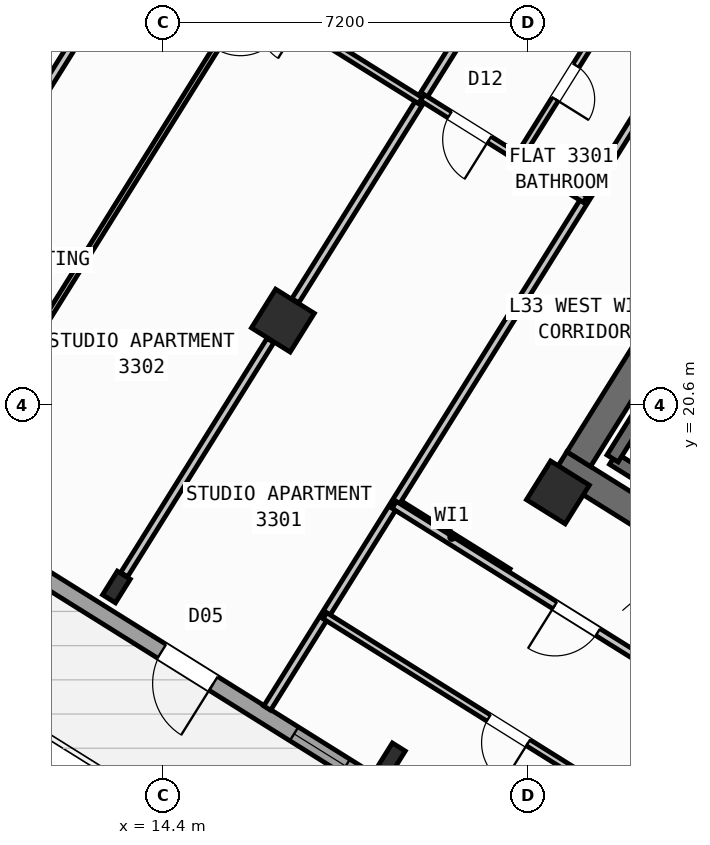
"""IFC4 building model, lengths in metres.
Left out: names, types, materials, properties, quantities, classifications, styles, units other than length and angle.
Written with IfcOpenShell. Run it as: python <this file> out.ifc"""

import sys

from ifc_helpers import new_model, si_unit, direction, frame, frame_2d, origin, origin_2d, place, context, subcontext, project, spatial, rectangle, hollow_rectangle, i_section, extrude, source, transform, mapped, element, fill, save


model = new_model("IFC4")
c1 = context("Model", 3, precision=1e-05, world=origin(), true_north=direction((0.0, 1.0)))
c2 = subcontext(c1, "Body", "Model", "MODEL_VIEW")
j1 = project(units=[si_unit("LENGTHUNIT", "METRE"), si_unit("PLANEANGLEUNIT", "RADIAN")], contexts=[c1])
p1 = place(None, origin())
s1 = spatial("IfcSite", under=j1, at=p1, CompositionType="ELEMENT")
p2 = place(p1, origin())
s2 = spatial("IfcBuilding", under=s1, at=p2, CompositionType="ELEMENT")
p3 = place(p2, frame((0.0, 0.0, 132.6)))
s3 = spatial("IfcBuildingStorey", under=s2, at=p3, CompositionType="ELEMENT", Elevation=132.6)
p4 = place(p3, frame((33.366, 12.477, 0.0), z_axis=(0.0, 0.0, 1.0), x_axis=(-0.848047359947, 0.529920442413, 0.0)))
e1 = element("IfcWall", 1, at=p4, inside=s3, PredefinedType="SHEAR", context=c2, shape_type="SweptSolid", body=[
    extrude(rectangle(XDim=13.14, YDim=0.55, at=frame_2d((6.57, 0.0))), origin(), (0.0, 0.0, 1.0), 3.32),
])
p5 = place(p3, frame((26.007, 24.976, 0.0), z_axis=(0.0, 0.0, 1.0), x_axis=(-0.529923795287, -0.848045264823, 0.0)))
e2 = element("IfcWall", 2, at=p5, inside=s3, PredefinedType="SHEAR", context=c2, shape_type="SweptSolid", body=[
    extrude(rectangle(XDim=6.425, YDim=0.55, at=frame_2d((3.212, 0.0))), origin(), (0.0, 0.0, 1.0), 3.32),
])
m1 = source(origin(), c2, "Body", "SweptSolid", [
    extrude(hollow_rectangle(XDim=0.9, YDim=0.9, WallThickness=0.036, at=origin_2d()), origin(), (0.0, 0.0, 1.0), 3.6),
])
p6 = place(p3, frame((22.191, 18.87, 0.0), z_axis=(0.0, 0.0, 1.0), x_axis=(-0.848048096156, 0.529919264233, 0.0)))
e3 = element("IfcColumn", 3, at=p6, inside=s3, PredefinedType="COLUMN", context=c2, shape_type="MappedRepresentation", body=[
    mapped(m1, transform((0.0, 0.0, 0.0), scale=1.0)),
])
m2 = source(origin(), c2, "Body", "SweptSolid", [
    extrude(i_section(OverallWidth=0.3, OverallDepth=0.55, WebThickness=0.015, FlangeThickness=0.029, at=origin_2d()), origin(), (0.0, 0.0, 1.0), 3.6),
])
p7 = place(p3, frame((18.906, 13.612, 0.0), z_axis=(0.0, 0.0, 1.0), x_axis=(-0.848048096156, 0.529919264233, 0.0)))
e4 = element("IfcColumn", 4, at=p7, inside=s3, PredefinedType="COLUMN", context=c2, shape_type="MappedRepresentation", body=[
    mapped(m2, transform((0.0, 0.0, 0.0), scale=1.0)),
])
p8 = place(p3, frame((16.764, 22.261, 0.0), z_axis=(0.0, 0.0, 1.0), x_axis=(-0.848048096156, 0.529919264233, 0.0)))
e5 = element("IfcColumn", 5, at=p8, inside=s3, PredefinedType="COLUMN", context=c2, shape_type="MappedRepresentation", body=[
    mapped(m1, transform((0.0, 0.0, 0.0), scale=1.0)),
])
p9 = place(p3, frame((13.478, 17.003, 0.0), z_axis=(0.0, 0.0, 1.0), x_axis=(-0.848048096156, 0.529919264233, 0.0)))
e6 = element("IfcColumn", 6, at=p9, inside=s3, PredefinedType="COLUMN", context=c2, shape_type="MappedRepresentation", body=[
    mapped(m2, transform((0.0, 0.0, 0.0), scale=1.0)),
])
p10 = place(p3, frame((29.268, 6.429, 0.0), z_axis=(0.0, 0.0, 1.0), x_axis=(-0.848049971435, 0.529916263149, 0.0)))
e7 = element("IfcWall", 7, at=p10, inside=s3, PredefinedType="STANDARD", context=c2, shape_type="SweptSolid", body=[
    extrude(rectangle(XDim=31.588, YDim=0.32, at=frame_2d((15.794, 0.0))), origin(), (0.0, 0.0, 1.0), 3.32),
])
p11 = place(p10, frame((16.362, 0.0, 0.0)))
e8 = element("IfcOpeningElement", 8, at=p11, cuts=e7, PredefinedType="OPENING", context=c2, shape_type="SweptSolid", body=[
    extrude(rectangle(XDim=1.2, YDim=2.15, at=frame_2d((0.6, 1.075))), frame((0.0, 0.17, 0.0), z_axis=(0.0, -1.0, 0.0), x_axis=(1.0, 0.0, 0.0)), (0.0, 0.0, 1.0), 0.34),
])
p12 = place(p10, frame((2.989, 0.0, 0.8)))
e9 = element("IfcOpeningElement", 9, at=p12, cuts=e7, PredefinedType="OPENING", context=c2, shape_type="SweptSolid", body=[
    extrude(rectangle(XDim=2.1, YDim=1.55, at=frame_2d((1.05, 0.775))), frame((0.0, 0.17, 0.0), z_axis=(0.0, -1.0, 0.0), x_axis=(1.0, 0.0, 0.0)), (0.0, 0.0, 1.0), 0.34),
])
p13 = place(p10, frame((8.359, 0.0, 0.8)))
e10 = element("IfcOpeningElement", 10, at=p13, cuts=e7, PredefinedType="OPENING", context=c2, shape_type="SweptSolid", body=[
    extrude(rectangle(XDim=2.1, YDim=1.55, at=frame_2d((1.05, 0.775))), frame((0.0, 0.17, 0.0), z_axis=(0.0, -1.0, 0.0), x_axis=(1.0, 0.0, 0.0)), (0.0, 0.0, 1.0), 0.34),
])
p14 = place(p10, frame((13.284, 0.0, 0.95)))
e11 = element("IfcOpeningElement", 11, at=p14, cuts=e7, PredefinedType="OPENING", context=c2, shape_type="SweptSolid", body=[
    extrude(rectangle(XDim=1.2, YDim=1.4, at=frame_2d((0.6, 0.7))), frame((0.0, 0.17, 0.0), z_axis=(0.0, -1.0, 0.0), x_axis=(1.0, 0.0, 0.0)), (0.0, 0.0, 1.0), 0.34),
])
p15 = place(p10, frame((20.39, 0.0, 0.95)))
e12 = element("IfcOpeningElement", 12, at=p15, cuts=e7, PredefinedType="OPENING", context=c2, shape_type="SweptSolid", body=[
    extrude(rectangle(XDim=1.2, YDim=1.4, at=frame_2d((0.6, 0.7))), frame((0.0, 0.17, 0.0), z_axis=(0.0, -1.0, 0.0), x_axis=(1.0, 0.0, 0.0)), (0.0, 0.0, 1.0), 0.34),
])
p16 = place(p10, frame((23.715, 0.0, 1.0)))
e13 = element("IfcOpeningElement", 13, at=p16, cuts=e7, PredefinedType="OPENING", context=c2, shape_type="SweptSolid", body=[
    extrude(rectangle(XDim=0.9, YDim=1.25, at=frame_2d((0.45, 0.625))), frame((0.0, 0.17, 0.0), z_axis=(0.0, -1.0, 0.0), x_axis=(1.0, 0.0, 0.0)), (0.0, 0.0, 1.0), 0.34),
])
p17 = place(p10, frame((27.481, 0.0, 0.8)))
e14 = element("IfcOpeningElement", 14, at=p17, cuts=e7, PredefinedType="OPENING", context=c2, shape_type="SweptSolid", body=[
    extrude(rectangle(XDim=2.1, YDim=1.55, at=frame_2d((1.05, 0.775))), frame((0.0, 0.17, 0.0), z_axis=(0.0, -1.0, 0.0), x_axis=(1.0, 0.0, 0.0)), (0.0, 0.0, 1.0), 0.34),
])
p18 = place(p3, frame((2.415, 23.452, 0.0), z_axis=(0.0, 0.0, 1.0), x_axis=(0.52991049553, 0.848053575387, 0.0)))
e15 = element("IfcWall", 15, at=p18, inside=s3, PredefinedType="STANDARD", context=c2, shape_type="SweptSolid", body=[
    extrude(rectangle(XDim=21.587, YDim=0.32, at=frame_2d((10.794, 0.0))), origin(), (0.0, 0.0, 1.0), 2.745),
])
p19 = place(p18, frame((2.168, 0.0, 0.8)))
e16 = element("IfcOpeningElement", 16, at=p19, cuts=e15, PredefinedType="OPENING", context=c2, shape_type="SweptSolid", body=[
    extrude(rectangle(XDim=2.1, YDim=1.55, at=frame_2d((1.05, 0.775))), frame((0.0, 0.17, 0.0), z_axis=(0.0, -1.0, 0.0), x_axis=(1.0, 0.0, 0.0)), (0.0, 0.0, 1.0), 0.34),
])
p20 = place(p18, frame((9.344, 0.0, 0.85)))
e17 = element("IfcOpeningElement", 17, at=p20, cuts=e15, PredefinedType="OPENING", context=c2, shape_type="SweptSolid", body=[
    extrude(rectangle(XDim=1.8, YDim=1.5, at=frame_2d((0.9, 0.75))), frame((0.0, 0.17, 0.0), z_axis=(0.0, -1.0, 0.0), x_axis=(1.0, 0.0, 0.0)), (0.0, 0.0, 1.0), 0.34),
])
p21 = place(p18, frame((18.459, 0.0, 0.85)))
e18 = element("IfcOpeningElement", 18, at=p21, cuts=e15, PredefinedType="OPENING", context=c2, shape_type="SweptSolid", body=[
    extrude(rectangle(XDim=1.5, YDim=1.5, at=frame_2d((0.75, 0.75))), frame((0.0, 0.17, 0.0), z_axis=(0.0, -1.0, 0.0), x_axis=(1.0, 0.0, 0.0)), (0.0, 0.0, 1.0), 0.34),
])
p22 = place(p3, frame((14.138, 41.825, 0.0), z_axis=(0.0, 0.0, 1.0), x_axis=(0.848046498049, -0.529921821731, 0.0)))
e19 = element("IfcWall", 19, at=p22, inside=s3, PredefinedType="STANDARD", context=c2, shape_type="SweptSolid", body=[
    extrude(rectangle(XDim=31.588, YDim=0.32, at=frame_2d((15.794, 0.0))), origin(), (0.0, 0.0, 1.0), 3.32),
])
p23 = place(p22, frame((3.253, 0.0, 0.0)))
e20 = element("IfcOpeningElement", 20, at=p23, cuts=e19, PredefinedType="OPENING", context=c2, shape_type="SweptSolid", body=[
    extrude(rectangle(XDim=1.05, YDim=2.15, at=frame_2d((0.525, 1.075))), frame((0.0, 0.17, 0.0), z_axis=(0.0, -1.0, 0.0), x_axis=(1.0, 0.0, 0.0)), (0.0, 0.0, 1.0), 0.34),
])
p24 = place(p22, frame((0.863, 0.0, 0.85)))
e21 = element("IfcOpeningElement", 21, at=p24, cuts=e19, PredefinedType="OPENING", context=c2, shape_type="SweptSolid", body=[
    extrude(rectangle(XDim=1.8, YDim=1.5, at=frame_2d((0.9, 0.75))), frame((0.0, 0.17, 0.0), z_axis=(0.0, -1.0, 0.0), x_axis=(1.0, 0.0, 0.0)), (0.0, 0.0, 1.0), 0.34),
])
p25 = place(p22, frame((8.435, 0.0, 0.85)))
e22 = element("IfcOpeningElement", 22, at=p25, cuts=e19, PredefinedType="OPENING", context=c2, shape_type="SweptSolid", body=[
    extrude(rectangle(XDim=1.8, YDim=1.5, at=frame_2d((0.9, 0.75))), frame((0.0, 0.17, 0.0), z_axis=(0.0, -1.0, 0.0), x_axis=(1.0, 0.0, 0.0)), (0.0, 0.0, 1.0), 0.34),
])
p26 = place(p22, frame((13.874, 0.0, 0.85)))
e23 = element("IfcOpeningElement", 23, at=p26, cuts=e19, PredefinedType="OPENING", context=c2, shape_type="SweptSolid", body=[
    extrude(rectangle(XDim=1.5, YDim=1.5, at=frame_2d((0.75, 0.75))), frame((0.0, 0.17, 0.0), z_axis=(0.0, -1.0, 0.0), x_axis=(1.0, 0.0, 0.0)), (0.0, 0.0, 1.0), 0.34),
])
p27 = place(p22, frame((17.104, 0.0, 1.0)))
e24 = element("IfcOpeningElement", 24, at=p27, cuts=e19, PredefinedType="OPENING", context=c2, shape_type="SweptSolid", body=[
    extrude(rectangle(XDim=0.9, YDim=1.25, at=frame_2d((0.45, 0.625))), frame((0.0, 0.17, 0.0), z_axis=(0.0, -1.0, 0.0), x_axis=(1.0, 0.0, 0.0)), (0.0, 0.0, 1.0), 0.34),
])
p28 = place(p22, frame((22.131, 0.0, 1.0)))
e25 = element("IfcOpeningElement", 25, at=p28, cuts=e19, PredefinedType="OPENING", context=c2, shape_type="SweptSolid", body=[
    extrude(rectangle(XDim=0.9, YDim=1.25, at=frame_2d((0.45, 0.625))), frame((0.0, 0.17, 0.0), z_axis=(0.0, -1.0, 0.0), x_axis=(1.0, 0.0, 0.0)), (0.0, 0.0, 1.0), 0.34),
])
p29 = place(p22, frame((27.706, 0.0, 1.0)))
e26 = element("IfcOpeningElement", 26, at=p29, cuts=e19, PredefinedType="OPENING", context=c2, shape_type="SweptSolid", body=[
    extrude(rectangle(XDim=0.9, YDim=1.25, at=frame_2d((0.45, 0.625))), frame((0.0, 0.17, 0.0), z_axis=(0.0, -1.0, 0.0), x_axis=(1.0, 0.0, 0.0)), (0.0, 0.0, 1.0), 0.34),
])
p30 = place(p3, frame((29.605, 15.581, 0.0), z_axis=(0.0, 0.0, 1.0), x_axis=(-0.848036911448, 0.529937163087, 0.0)))
e27 = element("IfcWall", 27, at=p30, inside=s3, PredefinedType="SHEAR", context=c2, shape_type="SweptSolid", body=[
    extrude(rectangle(XDim=7.46, YDim=0.26, at=frame_2d((3.73, 0.0))), origin(), (0.0, 0.0, 1.0), 3.32),
])
p31 = place(p3, frame((24.945, 22.22, 0.0), z_axis=(0.0, 0.0, 1.0), x_axis=(-0.529908658664, -0.84805472316, 0.0)))
e28 = element("IfcWall", 28, at=p31, inside=s3, PredefinedType="SHEAR", context=c2, shape_type="SweptSolid", body=[
    extrude(rectangle(XDim=3.16, YDim=0.26, at=frame_2d((1.58, 0.0))), origin(), (0.0, 0.0, 1.0), 3.32),
])
p32 = place(p3, frame((21.206, 17.292, 0.0), z_axis=(0.0, 0.0, 1.0), x_axis=(-0.848050851465, 0.529914854792, 0.0)))
e29 = element("IfcWall", 29, at=p32, inside=s3, PredefinedType="PARTITIONING", context=c2, shape_type="SweptSolid", body=[
    extrude(rectangle(XDim=2.61, YDim=0.16, at=frame_2d((1.305, 0.0))), origin(), (0.0, 0.0, 1.0), 3.31),
])
p33 = place(p3, frame((24.588, 27.631, 0.0), z_axis=(0.0, 0.0, 1.0), x_axis=(-0.529914586043, -0.848051019396, 0.0)))
e30 = element("IfcWall", 30, at=p33, inside=s3, PredefinedType="PARTITIONING", context=c2, shape_type="SweptSolid", body=[
    extrude(rectangle(XDim=15.35, YDim=0.16, at=frame_2d((7.675, 0.0))), origin(), (0.0, 0.0, 1.0), 3.31),
])
p34 = place(p3, frame((20.387, 28.06, 0.0), z_axis=(0.0, 0.0, 1.0), x_axis=(-0.529902564924, -0.848058530814, 0.0)))
e31 = element("IfcWall", 31, at=p34, inside=s3, PredefinedType="PARTITIONING", context=c2, shape_type="SweptSolid", body=[
    extrude(rectangle(XDim=6.376, YDim=0.16, at=frame_2d((3.188, 0.0))), origin(), (0.0, 0.0, 1.0), 2.745),
])
p35 = place(p3, frame((16.519, 21.87, 0.0), z_axis=(0.0, 0.0, 1.0), x_axis=(-0.529922447305, -0.848046107144, 0.0)))
e32 = element("IfcWall", 32, at=p35, inside=s3, PredefinedType="PARTITIONING", context=c2, shape_type="SweptSolid", body=[
    extrude(rectangle(XDim=5.451, YDim=0.16, at=frame_2d((2.726, 0.0))), origin(), (0.0, 0.0, 1.0), 2.745),
])
p36 = place(p3, frame((22.728, 24.654, 0.0), z_axis=(0.0, 0.0, 1.0), x_axis=(-0.848059820872, 0.529900500304, 0.0)))
e33 = element("IfcWall", 33, at=p36, inside=s3, PredefinedType="PLUMBINGWALL", context=c2, shape_type="SweptSolid", body=[
    extrude(rectangle(XDim=3.79, YDim=0.14, at=frame_2d((1.895, 0.0))), origin(), (0.0, 0.0, 1.0), 3.31),
])
p37 = place(p36, frame((2.23, 0.0, 0.0)))
e34 = element("IfcOpeningElement", 34, at=p37, cuts=e33, PredefinedType="OPENING", context=c2, shape_type="SweptSolid", body=[
    extrude(rectangle(XDim=0.92, YDim=2.08, at=frame_2d((0.46, 1.04))), frame((0.0, 0.08, 0.0), z_axis=(0.0, -1.0, 0.0), x_axis=(1.0, 0.0, 0.0)), (0.0, 0.0, 1.0), 0.16),
])
p38 = place(p3, frame((23.273, 28.452, 0.0), z_axis=(0.0, 0.0, 1.0), x_axis=(-0.529867639402, -0.848080352747, 0.0)))
e35 = element("IfcWall", 35, at=p38, inside=s3, PredefinedType="PLUMBINGWALL", context=c2, shape_type="SweptSolid", body=[
    extrude(rectangle(XDim=3.51, YDim=0.14, at=frame_2d((1.755, 0.0))), origin(), (0.0, 0.0, 1.0), 2.935),
])
p39 = place(p38, frame((1.365, 0.0, 0.0)))
e36 = element("IfcOpeningElement", 36, at=p39, cuts=e35, PredefinedType="OPENING", context=c2, shape_type="SweptSolid", body=[
    extrude(rectangle(XDim=0.78, YDim=2.05, at=frame_2d((0.39, 1.025))), frame((0.0, 0.08, 0.0), z_axis=(0.0, -1.0, 0.0), x_axis=(1.0, 0.0, 0.0)), (0.0, 0.0, 1.0), 0.16),
])
p40 = place(p3, frame((14.96, 31.452, 0.0), z_axis=(0.0, 0.0, 1.0), x_axis=(-0.529947310719, -0.848030570122, 0.0)))
e37 = element("IfcWall", 37, at=p40, inside=s3, PredefinedType="PARTITIONING", context=c2, shape_type="SweptSolid", body=[
    extrude(rectangle(XDim=6.376, YDim=0.16, at=frame_2d((3.188, 0.0))), origin(), (0.0, 0.0, 1.0), 2.745),
])
p41 = place(p3, frame((19.477, 26.603, 0.0), z_axis=(0.0, 0.0, 1.0), x_axis=(-0.848039019877, 0.529933789039, 0.0)))
e38 = element("IfcWall", 38, at=p41, inside=s3, PredefinedType="PLUMBINGWALL", context=c2, shape_type="SweptSolid", body=[
    extrude(rectangle(XDim=6.4, YDim=0.14, at=frame_2d((3.2, 0.0))), origin(), (0.0, 0.0, 1.0), 3.31),
])
p42 = place(p41, frame((2.824, 0.0, 0.0)))
e39 = element("IfcOpeningElement", 39, at=p42, cuts=e38, PredefinedType="OPENING", context=c2, shape_type="SweptSolid", body=[
    extrude(rectangle(XDim=0.78, YDim=2.05, at=frame_2d((0.39, 1.025))), frame((0.0, 0.08, 0.0), z_axis=(0.0, -1.0, 0.0), x_axis=(1.0, 0.0, 0.0)), (0.0, 0.0, 1.0), 0.16),
])
p43 = place(p3, frame((16.112, 28.706, 0.0), z_axis=(0.0, 0.0, 1.0), x_axis=(-0.529929676091, -0.848041590017, 0.0)))
e40 = element("IfcWall", 40, at=p43, inside=s3, PredefinedType="PARTITIONING", context=c2, shape_type="SweptSolid", body=[
    extrude(rectangle(XDim=12.04, YDim=0.11, at=frame_2d((6.02, 0.0))), origin(), (0.0, 0.0, 1.0), 3.31),
])
p44 = place(p43, frame((0.35, 0.0, 0.0)))
e41 = element("IfcOpeningElement", 41, at=p44, cuts=e40, PredefinedType="OPENING", context=c2, shape_type="SweptSolid", body=[
    extrude(rectangle(XDim=0.92, YDim=2.08, at=frame_2d((0.46, 1.04))), frame((0.0, 0.065, 0.0), z_axis=(0.0, -1.0, 0.0), x_axis=(1.0, 0.0, 0.0)), (0.0, 0.0, 1.0), 0.13),
])
p45 = place(p3, frame((32.164, 10.374, 0.0), z_axis=(0.0, 0.0, 1.0), x_axis=(-0.848044107957, 0.529925646633, 0.0)))
e42 = element("IfcWall", 42, at=p45, inside=s3, PredefinedType="PARTITIONING", context=c2, shape_type="SweptSolid", body=[
    extrude(rectangle(XDim=15.57, YDim=0.16, at=frame_2d((7.785, 0.0))), origin(), (0.0, 0.0, 1.0), 3.31),
])
p46 = place(p45, frame((10.83, 0.0, 0.0)))
e43 = element("IfcOpeningElement", 43, at=p46, cuts=e42, PredefinedType="OPENING", context=c2, shape_type="SweptSolid", body=[
    extrude(rectangle(XDim=1.0, YDim=2.1, at=frame_2d((0.5, 1.05))), frame((0.0, 0.09, 0.0), z_axis=(0.0, -1.0, 0.0), x_axis=(1.0, 0.0, 0.0)), (0.0, 0.0, 1.0), 0.18),
])
p47 = place(p3, frame((29.72, 8.859, 0.0), z_axis=(0.0, 0.0, 1.0), x_axis=(-0.848049134363, 0.529917602752, 0.0)))
e44 = element("IfcWall", 44, at=p47, inside=s3, PredefinedType="PLUMBINGWALL", context=c2, shape_type="SweptSolid", body=[
    extrude(rectangle(XDim=14.3, YDim=0.14, at=frame_2d((7.15, 0.0))), origin(), (0.0, 0.0, 1.0), 3.31),
])
p48 = place(p47, frame((9.57, 0.0, 0.0)))
e45 = element("IfcOpeningElement", 45, at=p48, cuts=e44, PredefinedType="OPENING", context=c2, shape_type="SweptSolid", body=[
    extrude(rectangle(XDim=0.92, YDim=2.08, at=frame_2d((0.46, 1.04))), frame((0.0, 0.08, 0.0), z_axis=(0.0, -1.0, 0.0), x_axis=(1.0, 0.0, 0.0)), (0.0, 0.0, 1.0), 0.16),
])
m3 = source(origin(), c2, "Body", "SweptSolid", [
    extrude(rectangle(XDim=1.2, YDim=2.15, at=frame_2d((0.6, 1.075))), frame((0.0, 0.025, 0.0), z_axis=(0.0, -1.0, 0.0), x_axis=(1.0, 0.0, 0.0)), (0.0, 0.0, 1.0), 0.05),
])
p49 = place(p11, origin())
e46 = element("IfcDoor", 46, at=p49, inside=s3, OperationType="SINGLE_SWING_LEFT", PredefinedType="DOOR", context=c2, shape_type="MappedRepresentation", body=[
    mapped(m3, transform((0.0, 0.0, 0.0), scale=1.0)),
])
fill(e8, e46)
m4 = source(origin(), c2, "Body", "SweptSolid", [
    extrude(rectangle(XDim=1.2, YDim=1.4, at=frame_2d((0.6, 0.7))), frame((0.0, 0.03, 0.0), z_axis=(0.0, -1.0, 0.0), x_axis=(1.0, 0.0, 0.0)), (0.0, 0.0, 1.0), 0.06),
])
p50 = place(p14, origin())
e47 = element("IfcWindow", 47, at=p50, inside=s3, PartitioningType="SINGLE_PANEL", PredefinedType="WINDOW", context=c2, shape_type="MappedRepresentation", body=[
    mapped(m4, transform((0.0, 0.0, 0.0), scale=1.0)),
])
fill(e11, e47)
m5 = source(origin(), c2, "Body", "SweptSolid", [
    extrude(rectangle(XDim=0.92, YDim=2.08, at=frame_2d((0.46, 1.04))), frame((0.0, 0.025, 0.0), z_axis=(0.0, -1.0, 0.0), x_axis=(1.0, 0.0, 0.0)), (0.0, 0.0, 1.0), 0.05),
])
p51 = place(p37, origin())
e48 = element("IfcDoor", 48, at=p51, inside=s3, OperationType="SINGLE_SWING_LEFT", PredefinedType="DOOR", context=c2, shape_type="MappedRepresentation", body=[
    mapped(m5, transform((0.0, 0.0, 0.0), scale=1.0)),
])
fill(e34, e48)
m6 = source(origin(), c2, "Body", "SweptSolid", [
    extrude(rectangle(XDim=0.78, YDim=2.05, at=frame_2d((0.39, 1.025))), frame((0.0, 0.025, 0.0), z_axis=(0.0, -1.0, 0.0), x_axis=(1.0, 0.0, 0.0)), (0.0, 0.0, 1.0), 0.05),
])
p52 = place(p39, origin())
e49 = element("IfcDoor", 49, at=p52, inside=s3, OperationType="SINGLE_SWING_RIGHT", PredefinedType="DOOR", context=c2, shape_type="MappedRepresentation", body=[
    mapped(m6, transform((0.0, 0.0, 0.0), scale=1.0)),
])
fill(e36, e49)
m7 = source(origin(), c2, "Body", "SweptSolid", [
    extrude(rectangle(XDim=1.0, YDim=2.1, at=frame_2d((0.5, 1.05))), frame((0.0, 0.025, 0.0), z_axis=(0.0, -1.0, 0.0), x_axis=(1.0, 0.0, 0.0)), (0.0, 0.0, 1.0), 0.05),
])
p53 = place(p46, origin())
e50 = element("IfcDoor", 50, at=p53, inside=s3, OperationType="SINGLE_SWING_RIGHT", PredefinedType="DOOR", context=c2, shape_type="MappedRepresentation", body=[
    mapped(m7, transform((0.0, 0.0, 0.0), scale=1.0)),
])
fill(e43, e50)
p54 = place(p48, origin())
e51 = element("IfcDoor", 51, at=p54, inside=s3, OperationType="SINGLE_SWING_LEFT", PredefinedType="DOOR", context=c2, shape_type="MappedRepresentation", body=[
    mapped(m5, transform((0.0, 0.0, 0.0), scale=1.0)),
])
fill(e45, e51)
save(model, sys.argv[1])
